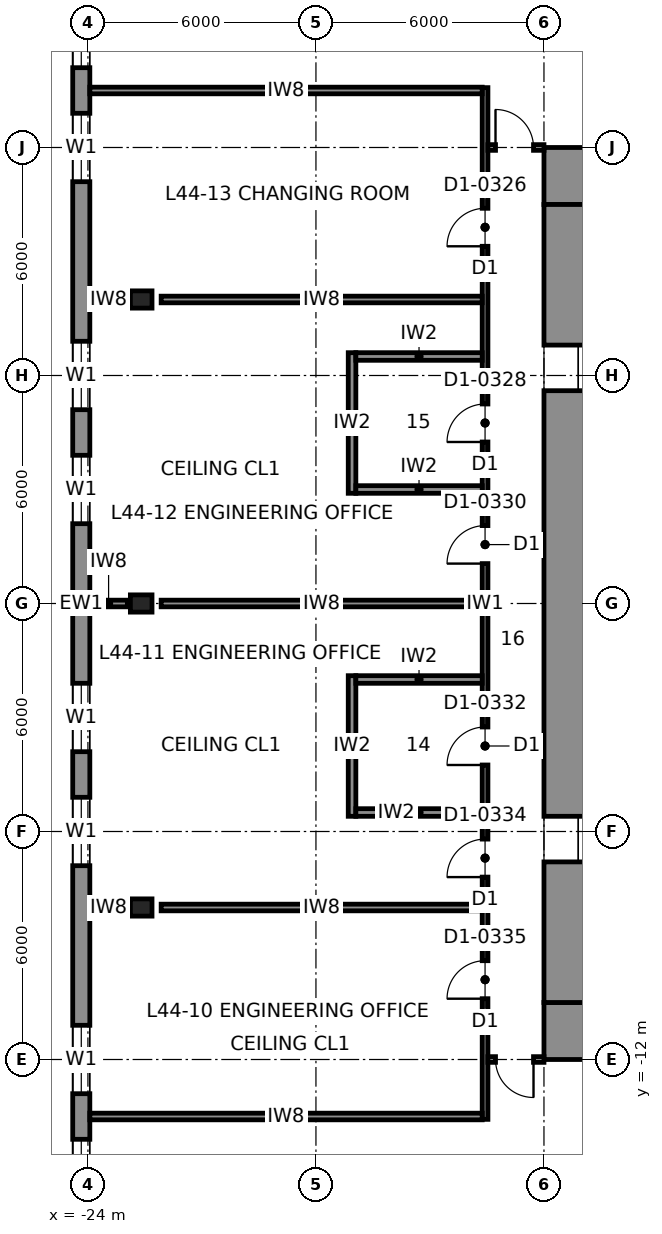
"""IFC4 building model, lengths in metres.
Left out: names, types, materials, properties, quantities, classifications, styles, units other than length and angle.
Written with IfcOpenShell. Run it as: python <this file> out.ifc"""

import sys

from ifc_helpers import new_model, si_unit, direction, frame, frame_2d, origin, origin_2d, place, context, subcontext, project, spatial, rectangle, i_section, extrude, element, fill, save


model = new_model("IFC4")
c1 = context("Model", 3, precision=1e-05, world=origin(), true_north=direction((0.0, 1.0)))
c2 = subcontext(c1, "Body", "Model", "MODEL_VIEW")
j1 = project(units=[si_unit("LENGTHUNIT", "METRE"), si_unit("PLANEANGLEUNIT", "RADIAN")], contexts=[c1])
p1 = place(None, origin())
s1 = spatial("IfcSite", under=j1, at=p1, CompositionType="ELEMENT")
p2 = place(p1, origin())
s2 = spatial("IfcBuilding", under=s1, at=p2, CompositionType="ELEMENT")
p3 = place(p2, frame((0.0, 0.0, 205.8)))
s3 = spatial("IfcBuildingStorey", under=s2, at=p3, CompositionType="ELEMENT", Elevation=205.8)
for number, where, z_axis, x_axis in (
    (1, (-22.598, 0.0, 0.0), (0.04, 0.0, 0.999), (0.0, 1.0, 0.0)),
    (2, (-22.598, 8.0, 0.0), (0.04, 0.0, 0.999), (0.0, 1.0, 0.0)),
    (3, (-22.598, -8.0, 0.0), (0.04, 0.0, 0.999), (0.0, 1.0, 0.0)),
):
    element("IfcColumn", number, at=place(p3, frame(where, z_axis=z_axis, x_axis=x_axis)), inside=s3, PredefinedType="COLUMN", context=c2, shape_type="SweptSolid", body=[
        extrude(i_section(OverallWidth=0.454, OverallDepth=0.569, WebThickness=0.078, FlangeThickness=0.125, at=origin_2d()), origin(), (0.0, 0.0, 1.0), 4.003),
    ])
for number, where, z_axis, x_axis in (
    (4, (-12.0, 11.25, 0.0), (0.0, 0.0, 1.0), (1.0, 0.0, 0.0)),
    (5, (12.0, -11.25, 0.0), (0.0, 0.0, 1.0), (-1.0, 0.0, 0.0)),
):
    element("IfcWall", number, at=place(p3, frame(where, z_axis=z_axis, x_axis=x_axis)), inside=s3, PredefinedType="SHEAR", context=c2, shape_type="SweptSolid", body=[
        extrude(rectangle(XDim=24.0, YDim=1.5, at=frame_2d((12.0, 0.0))), origin(), (0.0, 0.0, 1.0), 4.0),
    ])
p4 = place(p3, frame((-11.25, -10.5, 0.0), z_axis=(0.0, 0.0, 1.0), x_axis=(0.0, 1.0, 0.0)))
e6 = element("IfcWall", 6, at=p4, inside=s3, PredefinedType="SHEAR", context=c2, shape_type="SweptSolid", body=[
    extrude(rectangle(XDim=21.0, YDim=1.5, at=frame_2d((10.5, 0.0))), origin(), (0.0, 0.0, 1.0), 4.0),
])
p5 = place(p4, frame((16.1, 0.0, 0.0)))
e7 = element("IfcOpeningElement", 7, at=p5, cuts=e6, PredefinedType="OPENING", context=c2, shape_type="SweptSolid", body=[
    extrude(rectangle(XDim=1.2, YDim=2.3, at=frame_2d((0.6, 1.15))), frame((0.0, 0.76, 0.0), z_axis=(0.0, -1.0, 0.0), x_axis=(1.0, 0.0, 0.0)), (0.0, 0.0, 1.0), 1.52),
])
p6 = place(p4, frame((3.7, 0.0, 0.0)))
e8 = element("IfcOpeningElement", 8, at=p6, cuts=e6, PredefinedType="OPENING", context=c2, shape_type="SweptSolid", body=[
    extrude(rectangle(XDim=1.2, YDim=2.3, at=frame_2d((0.6, 1.15))), frame((0.0, 0.76, 0.0), z_axis=(0.0, -1.0, 0.0), x_axis=(1.0, 0.0, 0.0)), (0.0, 0.0, 1.0), 1.52),
])
p7 = place(p3, frame((-24.175, 19.9, 0.0), z_axis=(0.0, 0.0, 1.0), x_axis=(0.0, -1.0, 0.0)))
e9 = element("IfcWall", 9, at=p7, inside=s3, PredefinedType="SOLIDWALL", context=c2, shape_type="SweptSolid", body=[
    extrude(rectangle(XDim=39.8, YDim=0.45, at=frame_2d((19.9, 0.0))), origin(), (0.0, 0.0, 1.0), 3.83),
])
p8 = place(p7, frame((4.0, 0.0, 0.7)))
e10 = element("IfcOpeningElement", 10, at=p8, cuts=e9, PredefinedType="OPENING", context=c2, shape_type="SweptSolid", body=[
    extrude(rectangle(XDim=1.8, YDim=2.6, at=frame_2d((0.9, 1.3))), frame((0.0, 0.235, 0.0), z_axis=(0.0, -1.0, 0.0), x_axis=(1.0, 0.0, 0.0)), (0.0, 0.0, 1.0), 0.47),
])
p9 = place(p7, frame((7.0, 0.0, 0.7)))
e11 = element("IfcOpeningElement", 11, at=p9, cuts=e9, PredefinedType="OPENING", context=c2, shape_type="SweptSolid", body=[
    extrude(rectangle(XDim=1.8, YDim=2.6, at=frame_2d((0.9, 1.3))), frame((0.0, 0.235, 0.0), z_axis=(0.0, -1.0, 0.0), x_axis=(1.0, 0.0, 0.0)), (0.0, 0.0, 1.0), 0.47),
])
p10 = place(p7, frame((13.0, 0.0, 0.7)))
e12 = element("IfcOpeningElement", 12, at=p10, cuts=e9, PredefinedType="OPENING", context=c2, shape_type="SweptSolid", body=[
    extrude(rectangle(XDim=1.8, YDim=2.6, at=frame_2d((0.9, 1.3))), frame((0.0, 0.235, 0.0), z_axis=(0.0, -1.0, 0.0), x_axis=(1.0, 0.0, 0.0)), (0.0, 0.0, 1.0), 0.47),
])
p11 = place(p7, frame((16.0, 0.0, 0.7)))
e13 = element("IfcOpeningElement", 13, at=p11, cuts=e9, PredefinedType="OPENING", context=c2, shape_type="SweptSolid", body=[
    extrude(rectangle(XDim=1.8, YDim=2.6, at=frame_2d((0.9, 1.3))), frame((0.0, 0.235, 0.0), z_axis=(0.0, -1.0, 0.0), x_axis=(1.0, 0.0, 0.0)), (0.0, 0.0, 1.0), 0.47),
])
p12 = place(p7, frame((22.0, 0.0, 0.7)))
e14 = element("IfcOpeningElement", 14, at=p12, cuts=e9, PredefinedType="OPENING", context=c2, shape_type="SweptSolid", body=[
    extrude(rectangle(XDim=1.8, YDim=2.6, at=frame_2d((0.9, 1.3))), frame((0.0, 0.235, 0.0), z_axis=(0.0, -1.0, 0.0), x_axis=(1.0, 0.0, 0.0)), (0.0, 0.0, 1.0), 0.47),
])
p13 = place(p7, frame((25.0, 0.0, 0.7)))
e15 = element("IfcOpeningElement", 15, at=p13, cuts=e9, PredefinedType="OPENING", context=c2, shape_type="SweptSolid", body=[
    extrude(rectangle(XDim=1.8, YDim=2.6, at=frame_2d((0.9, 1.3))), frame((0.0, 0.235, 0.0), z_axis=(0.0, -1.0, 0.0), x_axis=(1.0, 0.0, 0.0)), (0.0, 0.0, 1.0), 0.47),
])
p14 = place(p7, frame((31.0, 0.0, 0.7)))
e16 = element("IfcOpeningElement", 16, at=p14, cuts=e9, PredefinedType="OPENING", context=c2, shape_type="SweptSolid", body=[
    extrude(rectangle(XDim=1.8, YDim=2.6, at=frame_2d((0.9, 1.3))), frame((0.0, 0.235, 0.0), z_axis=(0.0, -1.0, 0.0), x_axis=(1.0, 0.0, 0.0)), (0.0, 0.0, 1.0), 0.47),
])
p15 = place(p7, frame((34.0, 0.0, 0.7)))
e17 = element("IfcOpeningElement", 17, at=p15, cuts=e9, PredefinedType="OPENING", context=c2, shape_type="SweptSolid", body=[
    extrude(rectangle(XDim=1.8, YDim=2.6, at=frame_2d((0.9, 1.3))), frame((0.0, 0.235, 0.0), z_axis=(0.0, -1.0, 0.0), x_axis=(1.0, 0.0, 0.0)), (0.0, 0.0, 1.0), 0.47),
])
p16 = place(p3, frame((-13.55, 13.575, 0.0), z_axis=(0.0, 0.0, 1.0), x_axis=(0.0, -1.0, 0.0)))
e18 = element("IfcWall", 18, at=p16, inside=s3, PredefinedType="PARTITIONING", context=c2, shape_type="SweptSolid", body=[
    extrude(rectangle(XDim=27.15, YDim=0.15, at=frame_2d((13.575, 0.0))), origin(), (0.0, 0.0, 1.0), 3.83),
])
p17 = place(p16, frame((22.975, 0.0, 0.0)))
e19 = element("IfcOpeningElement", 19, at=p17, cuts=e18, PredefinedType="OPENING", context=c2, shape_type="SweptSolid", body=[
    extrude(rectangle(XDim=1.0, YDim=2.3, at=frame_2d((0.5, 1.15))), frame((0.0, 0.085, 0.0), z_axis=(0.0, -1.0, 0.0), x_axis=(1.0, 0.0, 0.0)), (0.0, 0.0, 1.0), 0.17),
])
p18 = place(p16, frame((19.775, 0.0, 0.0)))
e20 = element("IfcOpeningElement", 20, at=p18, cuts=e18, PredefinedType="OPENING", context=c2, shape_type="SweptSolid", body=[
    extrude(rectangle(XDim=1.0, YDim=2.3, at=frame_2d((0.5, 1.15))), frame((0.0, 0.085, 0.0), z_axis=(0.0, -1.0, 0.0), x_axis=(1.0, 0.0, 0.0)), (0.0, 0.0, 1.0), 0.17),
])
p19 = place(p16, frame((11.525, 0.0, 0.0)))
e21 = element("IfcOpeningElement", 21, at=p19, cuts=e18, PredefinedType="OPENING", context=c2, shape_type="SweptSolid", body=[
    extrude(rectangle(XDim=1.0, YDim=2.3, at=frame_2d((0.5, 1.15))), frame((0.0, 0.085, 0.0), z_axis=(0.0, -1.0, 0.0), x_axis=(1.0, 0.0, 0.0)), (0.0, 0.0, 1.0), 0.17),
])
p20 = place(p16, frame((3.175, 0.0, 0.0)))
e22 = element("IfcOpeningElement", 22, at=p20, cuts=e18, PredefinedType="OPENING", context=c2, shape_type="SweptSolid", body=[
    extrude(rectangle(XDim=1.0, YDim=2.3, at=frame_2d((0.5, 1.15))), frame((0.0, 0.085, 0.0), z_axis=(0.0, -1.0, 0.0), x_axis=(1.0, 0.0, 0.0)), (0.0, 0.0, 1.0), 0.17),
])
p21 = place(p16, frame((16.825, 0.0, 0.0)))
e23 = element("IfcOpeningElement", 23, at=p21, cuts=e18, PredefinedType="OPENING", context=c2, shape_type="SweptSolid", body=[
    extrude(rectangle(XDim=1.0, YDim=2.3, at=frame_2d((0.5, 1.15))), frame((0.0, 0.085, 0.0), z_axis=(0.0, -1.0, 0.0), x_axis=(1.0, 0.0, 0.0)), (0.0, 0.0, 1.0), 0.17),
])
p22 = place(p16, frame((8.325, 0.0, 0.0)))
e24 = element("IfcOpeningElement", 24, at=p22, cuts=e18, PredefinedType="OPENING", context=c2, shape_type="SweptSolid", body=[
    extrude(rectangle(XDim=1.0, YDim=2.3, at=frame_2d((0.5, 1.15))), frame((0.0, 0.085, 0.0), z_axis=(0.0, -1.0, 0.0), x_axis=(1.0, 0.0, 0.0)), (0.0, 0.0, 1.0), 0.17),
])
p23 = place(p3, frame((-13.475, 12.0, 0.0), z_axis=(0.0, 0.0, 1.0), x_axis=(1.0, 0.0, 0.0)))
e25 = element("IfcWall", 25, at=p23, inside=s3, PredefinedType="PARTITIONING", context=c2, shape_type="SweptSolid", body=[
    extrude(rectangle(XDim=1.475, YDim=0.15, at=frame_2d((0.738, 0.0))), origin(), (0.0, 0.0, 1.0), 3.83),
])
p24 = place(p23, frame((0.2, 0.0, 0.0)))
e26 = element("IfcOpeningElement", 26, at=p24, cuts=e25, PredefinedType="OPENING", context=c2, shape_type="SweptSolid", body=[
    extrude(rectangle(XDim=1.0, YDim=2.3, at=frame_2d((0.5, 1.15))), frame((0.0, 0.085, 0.0), z_axis=(0.0, -1.0, 0.0), x_axis=(1.0, 0.0, 0.0)), (0.0, 0.0, 1.0), 0.17),
])
p25 = place(p3, frame((-12.0, -12.0, 0.0), z_axis=(0.0, 0.0, 1.0), x_axis=(-1.0, 0.0, 0.0)))
e27 = element("IfcWall", 27, at=p25, inside=s3, PredefinedType="PARTITIONING", context=c2, shape_type="SweptSolid", body=[
    extrude(rectangle(XDim=1.475, YDim=0.15, at=frame_2d((0.738, 0.0))), origin(), (0.0, 0.0, 1.0), 3.83),
])
p26 = place(p25, frame((0.275, 0.0, 0.0)))
e28 = element("IfcOpeningElement", 28, at=p26, cuts=e27, PredefinedType="OPENING", context=c2, shape_type="SweptSolid", body=[
    extrude(rectangle(XDim=1.0, YDim=2.3, at=frame_2d((0.5, 1.15))), frame((0.0, 0.085, 0.0), z_axis=(0.0, -1.0, 0.0), x_axis=(1.0, 0.0, 0.0)), (0.0, 0.0, 1.0), 0.17),
])
for number, where, z_axis, x_axis in (
    (29, (-23.95, 13.5, 0.0), (0.0, 0.0, 1.0), (1.0, 0.0, 0.0)),
    (30, (-13.625, -13.5, 0.0), (0.0, 0.0, 1.0), (-1.0, 0.0, 0.0)),
):
    element("IfcWall", number, at=place(p3, frame(where, z_axis=z_axis, x_axis=x_axis)), inside=s3, PredefinedType="PARTITIONING", context=c2, shape_type="SweptSolid", body=[
        extrude(rectangle(XDim=10.325, YDim=0.175, at=frame_2d((5.163, 0.0))), origin(), (0.0, 0.0, 1.0), 3.83),
    ])
p27 = place(p3, frame((-13.625, -8.0, 0.0), z_axis=(0.0, 0.0, 1.0), x_axis=(-1.0, 0.0, 0.0)))
e31 = element("IfcWall", 31, at=p27, inside=s3, PredefinedType="PARTITIONING", context=c2, shape_type="SweptSolid", body=[
    extrude(rectangle(XDim=8.448, YDim=0.175, at=frame_2d((4.224, 0.0))), origin(), (0.0, 0.0, 1.0), 3.04),
])
p28 = place(p3, frame((-22.962, -8.0, 0.0), z_axis=(0.0, 0.0, 1.0), x_axis=(-1.0, 0.0, 0.0)))
e32 = element("IfcWall", 32, at=p28, inside=s3, PredefinedType="PARTITIONING", context=c2, shape_type="SweptSolid", body=[
    extrude(rectangle(XDim=0.988, YDim=0.175, at=frame_2d((0.494, 0.0))), origin(), (0.0, 0.0, 1.0), 3.83),
])
p29 = place(p3, frame((-13.625, 0.0, 0.0), z_axis=(0.0, 0.0, 1.0), x_axis=(-1.0, 0.0, 0.0)))
e33 = element("IfcWall", 33, at=p29, inside=s3, PredefinedType="PARTITIONING", context=c2, shape_type="SweptSolid", body=[
    extrude(rectangle(XDim=8.448, YDim=0.175, at=frame_2d((4.224, 0.0))), origin(), (0.0, 0.0, 1.0), 3.04),
])
p30 = place(p3, frame((-22.962, 0.0, 0.0), z_axis=(0.0, 0.0, 1.0), x_axis=(-1.0, 0.0, 0.0)))
e34 = element("IfcWall", 34, at=p30, inside=s3, PredefinedType="PARTITIONING", context=c2, shape_type="SweptSolid", body=[
    extrude(rectangle(XDim=0.988, YDim=0.175, at=frame_2d((0.494, 0.0))), origin(), (0.0, 0.0, 1.0), 3.83),
])
p31 = place(p3, frame((-13.625, 8.0, 0.0), z_axis=(0.0, 0.0, 1.0), x_axis=(-1.0, 0.0, 0.0)))
e35 = element("IfcWall", 35, at=p31, inside=s3, PredefinedType="PARTITIONING", context=c2, shape_type="SweptSolid", body=[
    extrude(rectangle(XDim=8.448, YDim=0.175, at=frame_2d((4.224, 0.0))), origin(), (0.0, 0.0, 1.0), 3.04),
])
p32 = place(p3, frame((-22.962, 8.0, 0.0), z_axis=(0.0, 0.0, 1.0), x_axis=(-1.0, 0.0, 0.0)))
e36 = element("IfcWall", 36, at=p32, inside=s3, PredefinedType="PARTITIONING", context=c2, shape_type="SweptSolid", body=[
    extrude(rectangle(XDim=0.988, YDim=0.175, at=frame_2d((0.494, 0.0))), origin(), (0.0, 0.0, 1.0), 3.83),
])
p33 = place(p3, frame((-17.05, -5.6, 0.0), z_axis=(0.0, 0.0, 1.0), x_axis=(0.0, 1.0, 0.0)))
e37 = element("IfcWall", 37, at=p33, inside=s3, PredefinedType="PARTITIONING", context=c2, shape_type="SweptSolid", body=[
    extrude(rectangle(XDim=3.7, YDim=0.2, at=frame_2d((1.85, 0.0))), origin(), (0.0, 0.0, 1.0), 3.83),
])
for number, where, z_axis, x_axis in (
    (38, (-13.625, -5.5, 0.0), (0.0, 0.0, 1.0), (-1.0, 0.0, 0.0)),
    (39, (-13.625, -2.0, 0.0), (0.0, 0.0, 1.0), (-1.0, 0.0, 0.0)),
):
    element("IfcWall", number, at=place(p3, frame(where, z_axis=z_axis, x_axis=x_axis)), inside=s3, PredefinedType="PARTITIONING", context=c2, shape_type="SweptSolid", body=[
        extrude(rectangle(XDim=3.325, YDim=0.2, at=frame_2d((1.663, 0.0))), origin(), (0.0, 0.0, 1.0), 3.83),
    ])
p34 = place(p3, frame((-17.05, 2.9, 0.0), z_axis=(0.0, 0.0, 1.0), x_axis=(0.0, 1.0, 0.0)))
e40 = element("IfcWall", 40, at=p34, inside=s3, PredefinedType="PARTITIONING", context=c2, shape_type="SweptSolid", body=[
    extrude(rectangle(XDim=3.7, YDim=0.2, at=frame_2d((1.85, 0.0))), origin(), (0.0, 0.0, 1.0), 3.83),
])
for number, where, z_axis, x_axis in (
    (41, (-13.625, 3.0, 0.0), (0.0, 0.0, 1.0), (-1.0, 0.0, 0.0)),
    (42, (-13.625, 6.5, 0.0), (0.0, 0.0, 1.0), (-1.0, 0.0, 0.0)),
):
    element("IfcWall", number, at=place(p3, frame(where, z_axis=z_axis, x_axis=x_axis)), inside=s3, PredefinedType="PARTITIONING", context=c2, shape_type="SweptSolid", body=[
        extrude(rectangle(XDim=3.325, YDim=0.2, at=frame_2d((1.663, 0.0))), origin(), (0.0, 0.0, 1.0), 3.83),
    ])
p35 = place(p8, origin())
e43 = element("IfcWindow", 43, at=p35, inside=s3, PartitioningType="SINGLE_PANEL", PredefinedType="WINDOW", context=c2, shape_type="SweptSolid", body=[
    extrude(rectangle(XDim=1.8, YDim=2.6, at=frame_2d((0.9, 1.3))), frame((0.0, 0.03, 0.0), z_axis=(0.0, -1.0, 0.0), x_axis=(1.0, 0.0, 0.0)), (0.0, 0.0, 1.0), 0.06),
])
fill(e10, e43)
p36 = place(p9, origin())
e44 = element("IfcWindow", 44, at=p36, inside=s3, PartitioningType="SINGLE_PANEL", PredefinedType="WINDOW", context=c2, shape_type="SweptSolid", body=[
    extrude(rectangle(XDim=1.8, YDim=2.6, at=frame_2d((0.9, 1.3))), frame((0.0, 0.03, 0.0), z_axis=(0.0, -1.0, 0.0), x_axis=(1.0, 0.0, 0.0)), (0.0, 0.0, 1.0), 0.06),
])
fill(e11, e44)
p37 = place(p10, origin())
e45 = element("IfcWindow", 45, at=p37, inside=s3, PartitioningType="SINGLE_PANEL", PredefinedType="WINDOW", context=c2, shape_type="SweptSolid", body=[
    extrude(rectangle(XDim=1.8, YDim=2.6, at=frame_2d((0.9, 1.3))), frame((0.0, 0.03, 0.0), z_axis=(0.0, -1.0, 0.0), x_axis=(1.0, 0.0, 0.0)), (0.0, 0.0, 1.0), 0.06),
])
fill(e12, e45)
p38 = place(p11, origin())
e46 = element("IfcWindow", 46, at=p38, inside=s3, PartitioningType="SINGLE_PANEL", PredefinedType="WINDOW", context=c2, shape_type="SweptSolid", body=[
    extrude(rectangle(XDim=1.8, YDim=2.6, at=frame_2d((0.9, 1.3))), frame((0.0, 0.03, 0.0), z_axis=(0.0, -1.0, 0.0), x_axis=(1.0, 0.0, 0.0)), (0.0, 0.0, 1.0), 0.06),
])
fill(e13, e46)
p39 = place(p12, origin())
e47 = element("IfcWindow", 47, at=p39, inside=s3, PartitioningType="SINGLE_PANEL", PredefinedType="WINDOW", context=c2, shape_type="SweptSolid", body=[
    extrude(rectangle(XDim=1.8, YDim=2.6, at=frame_2d((0.9, 1.3))), frame((0.0, 0.03, 0.0), z_axis=(0.0, -1.0, 0.0), x_axis=(1.0, 0.0, 0.0)), (0.0, 0.0, 1.0), 0.06),
])
fill(e14, e47)
p40 = place(p13, origin())
e48 = element("IfcWindow", 48, at=p40, inside=s3, PartitioningType="SINGLE_PANEL", PredefinedType="WINDOW", context=c2, shape_type="SweptSolid", body=[
    extrude(rectangle(XDim=1.8, YDim=2.6, at=frame_2d((0.9, 1.3))), frame((0.0, 0.03, 0.0), z_axis=(0.0, -1.0, 0.0), x_axis=(1.0, 0.0, 0.0)), (0.0, 0.0, 1.0), 0.06),
])
fill(e15, e48)
p41 = place(p14, origin())
e49 = element("IfcWindow", 49, at=p41, inside=s3, PartitioningType="SINGLE_PANEL", PredefinedType="WINDOW", context=c2, shape_type="SweptSolid", body=[
    extrude(rectangle(XDim=1.8, YDim=2.6, at=frame_2d((0.9, 1.3))), frame((0.0, 0.03, 0.0), z_axis=(0.0, -1.0, 0.0), x_axis=(1.0, 0.0, 0.0)), (0.0, 0.0, 1.0), 0.06),
])
fill(e16, e49)
p42 = place(p15, origin())
e50 = element("IfcWindow", 50, at=p42, inside=s3, PartitioningType="SINGLE_PANEL", PredefinedType="WINDOW", context=c2, shape_type="SweptSolid", body=[
    extrude(rectangle(XDim=1.8, YDim=2.6, at=frame_2d((0.9, 1.3))), frame((0.0, 0.03, 0.0), z_axis=(0.0, -1.0, 0.0), x_axis=(1.0, 0.0, 0.0)), (0.0, 0.0, 1.0), 0.06),
])
fill(e17, e50)
p43 = place(p24, origin())
e51 = element("IfcDoor", 51, at=p43, inside=s3, OperationType="SINGLE_SWING_LEFT", PredefinedType="DOOR", context=c2, shape_type="SweptSolid", body=[
    extrude(rectangle(XDim=1.0, YDim=2.3, at=frame_2d((0.5, 1.15))), frame((0.0, 0.025, 0.0), z_axis=(0.0, -1.0, 0.0), x_axis=(1.0, 0.0, 0.0)), (0.0, 0.0, 1.0), 0.05),
])
fill(e26, e51)
p44 = place(p26, origin())
e52 = element("IfcDoor", 52, at=p44, inside=s3, OperationType="SINGLE_SWING_LEFT", PredefinedType="DOOR", context=c2, shape_type="SweptSolid", body=[
    extrude(rectangle(XDim=1.0, YDim=2.3, at=frame_2d((0.5, 1.15))), frame((0.0, 0.025, 0.0), z_axis=(0.0, -1.0, 0.0), x_axis=(1.0, 0.0, 0.0)), (0.0, 0.0, 1.0), 0.05),
])
fill(e28, e52)
p45 = place(p17, frame((1.0, 0.0, 0.0), z_axis=(0.0, 0.0, 1.0), x_axis=(-1.0, 0.0, 0.0)))
e53 = element("IfcDoor", 53, at=p45, inside=s3, OperationType="SINGLE_SWING_LEFT", PredefinedType="DOOR", context=c2, shape_type="SweptSolid", body=[
    extrude(rectangle(XDim=1.0, YDim=2.3, at=frame_2d((0.5, 1.15))), frame((0.0, 0.025, 0.0), z_axis=(0.0, -1.0, 0.0), x_axis=(1.0, 0.0, 0.0)), (0.0, 0.0, 1.0), 0.05),
])
fill(e19, e53)
p46 = place(p18, frame((1.0, 0.0, 0.0), z_axis=(0.0, 0.0, 1.0), x_axis=(-1.0, 0.0, 0.0)))
e54 = element("IfcDoor", 54, at=p46, inside=s3, OperationType="SINGLE_SWING_LEFT", PredefinedType="DOOR", context=c2, shape_type="SweptSolid", body=[
    extrude(rectangle(XDim=1.0, YDim=2.3, at=frame_2d((0.5, 1.15))), frame((0.0, 0.025, 0.0), z_axis=(0.0, -1.0, 0.0), x_axis=(1.0, 0.0, 0.0)), (0.0, 0.0, 1.0), 0.05),
])
fill(e20, e54)
p47 = place(p19, frame((1.0, 0.0, 0.0), z_axis=(0.0, 0.0, 1.0), x_axis=(-1.0, 0.0, 0.0)))
e55 = element("IfcDoor", 55, at=p47, inside=s3, OperationType="SINGLE_SWING_LEFT", PredefinedType="DOOR", context=c2, shape_type="SweptSolid", body=[
    extrude(rectangle(XDim=1.0, YDim=2.3, at=frame_2d((0.5, 1.15))), frame((0.0, 0.025, 0.0), z_axis=(0.0, -1.0, 0.0), x_axis=(1.0, 0.0, 0.0)), (0.0, 0.0, 1.0), 0.05),
])
fill(e21, e55)
p48 = place(p20, frame((1.0, 0.0, 0.0), z_axis=(0.0, 0.0, 1.0), x_axis=(-1.0, 0.0, 0.0)))
e56 = element("IfcDoor", 56, at=p48, inside=s3, OperationType="SINGLE_SWING_LEFT", PredefinedType="DOOR", context=c2, shape_type="SweptSolid", body=[
    extrude(rectangle(XDim=1.0, YDim=2.3, at=frame_2d((0.5, 1.15))), frame((0.0, 0.025, 0.0), z_axis=(0.0, -1.0, 0.0), x_axis=(1.0, 0.0, 0.0)), (0.0, 0.0, 1.0), 0.05),
])
fill(e22, e56)
p49 = place(p21, frame((1.0, 0.0, 0.0), z_axis=(0.0, 0.0, 1.0), x_axis=(-1.0, 0.0, 0.0)))
e57 = element("IfcDoor", 57, at=p49, inside=s3, OperationType="SINGLE_SWING_LEFT", PredefinedType="DOOR", context=c2, shape_type="SweptSolid", body=[
    extrude(rectangle(XDim=1.0, YDim=2.3, at=frame_2d((0.5, 1.15))), frame((0.0, 0.025, 0.0), z_axis=(0.0, -1.0, 0.0), x_axis=(1.0, 0.0, 0.0)), (0.0, 0.0, 1.0), 0.05),
])
fill(e23, e57)
p50 = place(p22, frame((1.0, 0.0, 0.0), z_axis=(0.0, 0.0, 1.0), x_axis=(-1.0, 0.0, 0.0)))
e58 = element("IfcDoor", 58, at=p50, inside=s3, OperationType="SINGLE_SWING_LEFT", PredefinedType="DOOR", context=c2, shape_type="SweptSolid", body=[
    extrude(rectangle(XDim=1.0, YDim=2.3, at=frame_2d((0.5, 1.15))), frame((0.0, 0.025, 0.0), z_axis=(0.0, -1.0, 0.0), x_axis=(1.0, 0.0, 0.0)), (0.0, 0.0, 1.0), 0.05),
])
fill(e24, e58)
p51 = place(p5, frame((1.2, 0.0, 0.0), z_axis=(0.0, 0.0, 1.0), x_axis=(-1.0, 0.0, 0.0)))
e59 = element("IfcDoor", 59, at=p51, inside=s3, OperationType="SINGLE_SWING_LEFT", PredefinedType="DOOR", context=c2, shape_type="SweptSolid", body=[
    extrude(rectangle(XDim=1.2, YDim=2.3, at=frame_2d((0.6, 1.15))), frame((0.0, 0.025, 0.0), z_axis=(0.0, -1.0, 0.0), x_axis=(1.0, 0.0, 0.0)), (0.0, 0.0, 1.0), 0.05),
])
fill(e7, e59)
p52 = place(p6, frame((1.2, 0.0, 0.0), z_axis=(0.0, 0.0, 1.0), x_axis=(-1.0, 0.0, 0.0)))
e60 = element("IfcDoor", 60, at=p52, inside=s3, OperationType="SINGLE_SWING_LEFT", PredefinedType="DOOR", context=c2, shape_type="SweptSolid", body=[
    extrude(rectangle(XDim=1.2, YDim=2.3, at=frame_2d((0.6, 1.15))), frame((0.0, 0.025, 0.0), z_axis=(0.0, -1.0, 0.0), x_axis=(1.0, 0.0, 0.0)), (0.0, 0.0, 1.0), 0.05),
])
fill(e8, e60)
save(model, sys.argv[1])
